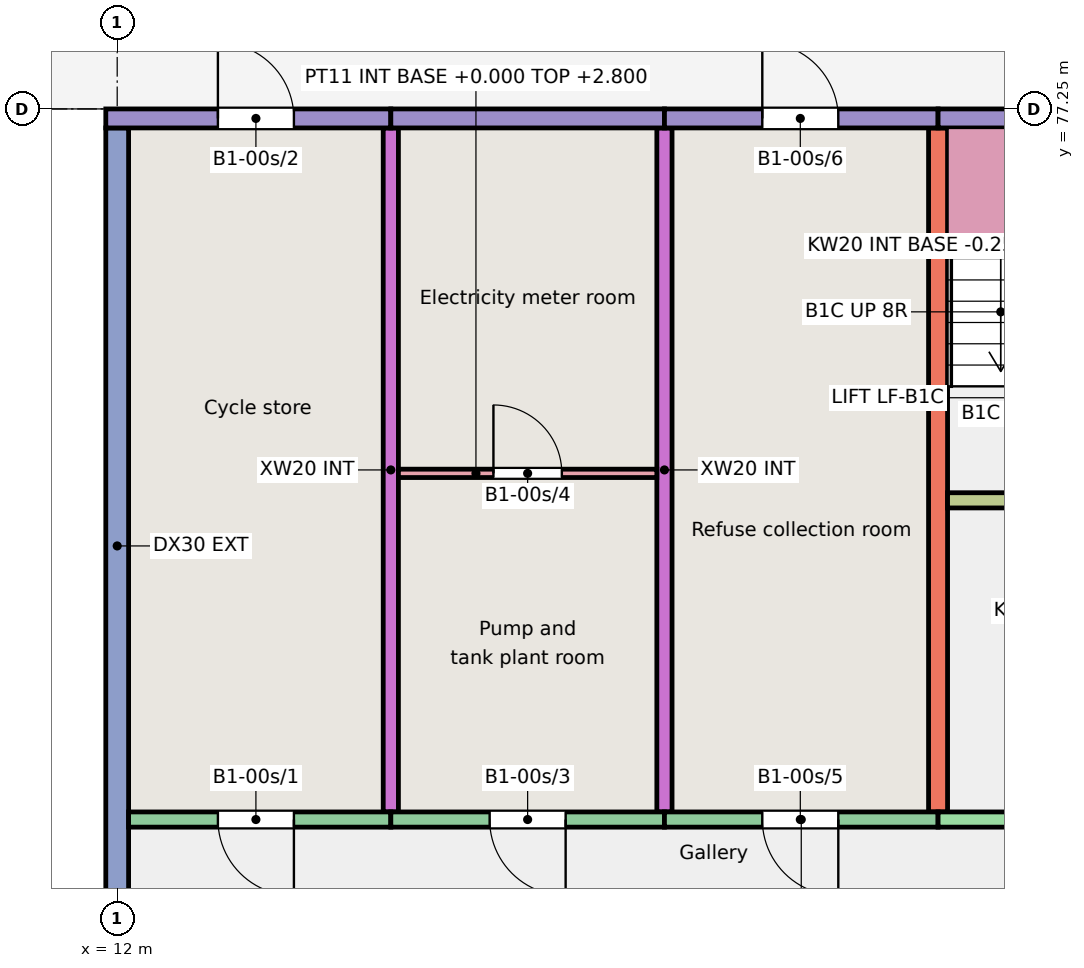
"""IFC4 building model, lengths in metres.
Left out: names, types, materials, properties, quantities, classifications, styles, units other than length and angle.
Written with IfcOpenShell. Run it as: python <this file> out.ifc"""

import sys

from ifc_helpers import new_model, si_unit, direction, frame, frame_2d, origin, place, context, subcontext, project, spatial, rectangle, extrude, element, fill, save


model = new_model("IFC4")
c1 = context("Model", 3, precision=1e-05, world=origin(), true_north=direction((0.0, 1.0)))
c2 = subcontext(c1, "Body", "Model", "MODEL_VIEW")
j1 = project(units=[si_unit("LENGTHUNIT", "METRE"), si_unit("PLANEANGLEUNIT", "RADIAN")], contexts=[c1])
p1 = place(None, origin())
s1 = spatial("IfcSite", under=j1, at=p1, CompositionType="ELEMENT")
p2 = place(p1, origin())
s2 = spatial("IfcBuilding", under=s1, at=p2, CompositionType="ELEMENT")
p3 = place(p2, origin())
s3 = spatial("IfcBuildingStorey", under=s2, at=p3, CompositionType="ELEMENT", Elevation=0.0)
p4 = place(p3, frame((12.0, 66.0, -0.25), z_axis=(0.0, 0.0, 1.0), x_axis=(0.0, 1.0, 0.0)))
e1 = element("IfcWall", 1, at=p4, inside=s3, PredefinedType="SHEAR", context=c2, shape_type="SweptSolid", body=[
    extrude(rectangle(XDim=11.0, YDim=0.3, at=frame_2d((5.5, 0.0))), origin(), (0.0, 0.0, 1.0), 3.25),
])
for number, where, z_axis, x_axis in (
    (2, (15.6, 68.0, -0.25), (0.0, 0.0, 1.0), (0.0, 1.0, 0.0)),
    (3, (19.2, 68.0, -0.25), (0.0, 0.0, 1.0), (0.0, 1.0, 0.0)),
):
    element("IfcWall", number, at=place(p3, frame(where, z_axis=z_axis, x_axis=x_axis)), inside=s3, PredefinedType="SHEAR", context=c2, shape_type="SweptSolid", body=[
        extrude(rectangle(XDim=9.0, YDim=0.2, at=frame_2d((4.5, 0.0))), origin(), (0.0, 0.0, 1.0), 3.25),
    ])
p5 = place(p3, frame((22.8, 68.0, -0.25), z_axis=(0.0, 0.0, 1.0), x_axis=(0.0, 1.0, 0.0)))
e4 = element("IfcWall", 4, at=p5, inside=s3, PredefinedType="SHEAR", context=c2, shape_type="SweptSolid", body=[
    extrude(rectangle(XDim=9.0, YDim=0.25, at=frame_2d((4.5, 0.0))), origin(), (0.0, 0.0, 1.0), 3.25),
])
p6 = place(p3, frame((11.85, 77.125, -0.25), z_axis=(0.0, 0.0, 1.0), x_axis=(1.0, 0.0, 0.0)))
e5 = element("IfcWall", 5, at=p6, inside=s3, PredefinedType="SOLIDWALL", context=c2, shape_type="SweptSolid", body=[
    extrude(rectangle(XDim=3.75, YDim=0.25, at=frame_2d((1.875, 0.0))), origin(), (0.0, 0.0, 1.0), 3.25),
])
p7 = place(p6, frame((1.475, 0.0, 0.25)))
e6 = element("IfcOpeningElement", 6, at=p7, cuts=e5, PredefinedType="OPENING", context=c2, shape_type="SweptSolid", body=[
    extrude(rectangle(XDim=1.0, YDim=2.1, at=frame_2d((0.5, 1.05))), frame((0.0, 0.135, 0.0), z_axis=(0.0, -1.0, 0.0), x_axis=(1.0, 0.0, 0.0)), (0.0, 0.0, 1.0), 0.27),
])
p8 = place(p3, frame((12.15, 67.9, -0.25), z_axis=(0.0, 0.0, 1.0), x_axis=(1.0, 0.0, 0.0)))
e7 = element("IfcWall", 7, at=p8, inside=s3, PredefinedType="SOLIDWALL", context=c2, shape_type="SweptSolid", body=[
    extrude(rectangle(XDim=3.45, YDim=0.2, at=frame_2d((1.725, 0.0))), origin(), (0.0, 0.0, 1.0), 3.25),
])
p9 = place(p8, frame((1.175, 0.0, 0.25)))
e8 = element("IfcOpeningElement", 8, at=p9, cuts=e7, PredefinedType="OPENING", context=c2, shape_type="SweptSolid", body=[
    extrude(rectangle(XDim=1.0, YDim=2.1, at=frame_2d((0.5, 1.05))), frame((0.0, 0.11, 0.0), z_axis=(0.0, -1.0, 0.0), x_axis=(1.0, 0.0, 0.0)), (0.0, 0.0, 1.0), 0.22),
])
p10 = place(p3, frame((15.6, 77.125, -0.25), z_axis=(0.0, 0.0, 1.0), x_axis=(1.0, 0.0, 0.0)))
e9 = element("IfcWall", 9, at=p10, inside=s3, PredefinedType="SOLIDWALL", context=c2, shape_type="SweptSolid", body=[
    extrude(rectangle(XDim=3.6, YDim=0.25, at=frame_2d((1.8, 0.0))), origin(), (0.0, 0.0, 1.0), 3.25),
])
p11 = place(p3, frame((15.6, 67.9, -0.25), z_axis=(0.0, 0.0, 1.0), x_axis=(1.0, 0.0, 0.0)))
e10 = element("IfcWall", 10, at=p11, inside=s3, PredefinedType="SOLIDWALL", context=c2, shape_type="SweptSolid", body=[
    extrude(rectangle(XDim=3.6, YDim=0.2, at=frame_2d((1.8, 0.0))), origin(), (0.0, 0.0, 1.0), 3.25),
])
p12 = place(p11, frame((1.3, 0.0, 0.25)))
e11 = element("IfcOpeningElement", 11, at=p12, cuts=e10, PredefinedType="OPENING", context=c2, shape_type="SweptSolid", body=[
    extrude(rectangle(XDim=1.0, YDim=2.1, at=frame_2d((0.5, 1.05))), frame((0.0, 0.11, 0.0), z_axis=(0.0, -1.0, 0.0), x_axis=(1.0, 0.0, 0.0)), (0.0, 0.0, 1.0), 0.22),
])
p13 = place(p3, frame((19.2, 77.125, -0.25), z_axis=(0.0, 0.0, 1.0), x_axis=(1.0, 0.0, 0.0)))
e12 = element("IfcWall", 12, at=p13, inside=s3, PredefinedType="SOLIDWALL", context=c2, shape_type="SweptSolid", body=[
    extrude(rectangle(XDim=3.6, YDim=0.25, at=frame_2d((1.8, 0.0))), origin(), (0.0, 0.0, 1.0), 3.25),
])
p14 = place(p13, frame((1.288, 0.0, 0.25)))
e13 = element("IfcOpeningElement", 13, at=p14, cuts=e12, PredefinedType="OPENING", context=c2, shape_type="SweptSolid", body=[
    extrude(rectangle(XDim=1.0, YDim=2.1, at=frame_2d((0.5, 1.05))), frame((0.0, 0.135, 0.0), z_axis=(0.0, -1.0, 0.0), x_axis=(1.0, 0.0, 0.0)), (0.0, 0.0, 1.0), 0.27),
])
p15 = place(p3, frame((19.2, 67.9, -0.25), z_axis=(0.0, 0.0, 1.0), x_axis=(1.0, 0.0, 0.0)))
e14 = element("IfcWall", 14, at=p15, inside=s3, PredefinedType="SOLIDWALL", context=c2, shape_type="SweptSolid", body=[
    extrude(rectangle(XDim=3.6, YDim=0.2, at=frame_2d((1.8, 0.0))), origin(), (0.0, 0.0, 1.0), 3.25),
])
p16 = place(p15, frame((1.288, 0.0, 0.25)))
e15 = element("IfcOpeningElement", 15, at=p16, cuts=e14, PredefinedType="OPENING", context=c2, shape_type="SweptSolid", body=[
    extrude(rectangle(XDim=1.0, YDim=2.1, at=frame_2d((0.5, 1.05))), frame((0.0, 0.11, 0.0), z_axis=(0.0, -1.0, 0.0), x_axis=(1.0, 0.0, 0.0)), (0.0, 0.0, 1.0), 0.22),
])
p17 = place(p3, frame((22.8, 77.125, -0.25), z_axis=(0.0, 0.0, 1.0), x_axis=(1.0, 0.0, 0.0)))
e16 = element("IfcWall", 16, at=p17, inside=s3, PredefinedType="SOLIDWALL", context=c2, shape_type="SweptSolid", body=[
    extrude(rectangle(XDim=6.0, YDim=0.25, at=frame_2d((3.0, 0.0))), origin(), (0.0, 0.0, 1.0), 3.25),
])
p18 = place(p17, frame((1.025, 0.0, 0.25)))
e17 = element("IfcOpeningElement", 17, at=p18, cuts=e16, PredefinedType="OPENING", context=c2, shape_type="SweptSolid", body=[
    extrude(rectangle(XDim=1.1, YDim=2.1, at=frame_2d((0.55, 1.05))), frame((0.0, 0.135, 0.0), z_axis=(0.0, -1.0, 0.0), x_axis=(1.0, 0.0, 0.0)), (0.0, 0.0, 1.0), 0.27),
])
p19 = place(p3, frame((22.8, 67.9, -0.25), z_axis=(0.0, 0.0, 1.0), x_axis=(1.0, 0.0, 0.0)))
e18 = element("IfcWall", 18, at=p19, inside=s3, PredefinedType="SHEAR", context=c2, shape_type="SweptSolid", body=[
    extrude(rectangle(XDim=5.85, YDim=0.2, at=frame_2d((2.925, 0.0))), origin(), (0.0, 0.0, 1.0), 3.25),
])
p20 = place(p19, frame((2.438, 0.0, 0.25)))
e19 = element("IfcOpeningElement", 19, at=p20, cuts=e18, PredefinedType="OPENING", context=c2, shape_type="SweptSolid", body=[
    extrude(rectangle(XDim=1.1, YDim=2.1, at=frame_2d((0.55, 1.05))), frame((0.0, 0.11, 0.0), z_axis=(0.0, -1.0, 0.0), x_axis=(1.0, 0.0, 0.0)), (0.0, 0.0, 1.0), 0.22),
])
p21 = place(p3, frame((22.925, 72.1, -0.25), z_axis=(0.0, 0.0, 1.0), x_axis=(1.0, 0.0, 0.0)))
e20 = element("IfcWall", 20, at=p21, inside=s3, PredefinedType="SHEAR", context=c2, shape_type="SweptSolid", body=[
    extrude(rectangle(XDim=5.725, YDim=0.2, at=frame_2d((2.862, 0.0))), origin(), (0.0, 0.0, 1.0), 3.25),
])
p22 = place(p21, frame((0.95, 0.0, 0.25)))
e21 = element("IfcOpeningElement", 21, at=p22, cuts=e20, PredefinedType="OPENING", context=c2, shape_type="SweptSolid", body=[
    extrude(rectangle(XDim=1.0, YDim=2.1, at=frame_2d((0.5, 1.05))), frame((0.0, 0.11, 0.0), z_axis=(0.0, -1.0, 0.0), x_axis=(1.0, 0.0, 0.0)), (0.0, 0.0, 1.0), 0.22),
])
p23 = place(p21, frame((3.863, 0.0, 0.25)))
e22 = element("IfcOpeningElement", 22, at=p23, cuts=e20, PredefinedType="OPENING", context=c2, shape_type="SweptSolid", body=[
    extrude(rectangle(XDim=1.1, YDim=2.1, at=frame_2d((0.55, 1.05))), frame((0.0, 0.11, 0.0), z_axis=(0.0, -1.0, 0.0), x_axis=(1.0, 0.0, 0.0)), (0.0, 0.0, 1.0), 0.22),
])
p24 = place(p3, frame((15.7, 72.455, 0.0), z_axis=(0.0, 0.0, 1.0), x_axis=(1.0, 0.0, 0.0)))
e23 = element("IfcWall", 23, at=p24, inside=s3, PredefinedType="PARTITIONING", context=c2, shape_type="SweptSolid", body=[
    extrude(rectangle(XDim=3.4, YDim=0.11, at=frame_2d((1.7, 0.0))), origin(), (0.0, 0.0, 1.0), 2.8),
])
p25 = place(p24, frame((1.25, 0.0, 0.0)))
e24 = element("IfcOpeningElement", 24, at=p25, cuts=e23, PredefinedType="OPENING", context=c2, shape_type="SweptSolid", body=[
    extrude(rectangle(XDim=0.9, YDim=2.1, at=frame_2d((0.45, 1.05))), frame((0.0, 0.065, 0.0), z_axis=(0.0, -1.0, 0.0), x_axis=(1.0, 0.0, 0.0)), (0.0, 0.0, 1.0), 0.13),
])
p26 = place(p9, origin())
e25 = element("IfcDoor", 25, at=p26, inside=s3, OperationType="SINGLE_SWING_RIGHT", PredefinedType="DOOR", context=c2, shape_type="SweptSolid", body=[
    extrude(rectangle(XDim=1.0, YDim=2.1, at=frame_2d((0.5, 1.05))), frame((0.0, 0.025, 0.0), z_axis=(0.0, -1.0, 0.0), x_axis=(1.0, 0.0, 0.0)), (0.0, 0.0, 1.0), 0.05),
])
fill(e8, e25)
p27 = place(p7, origin())
e26 = element("IfcDoor", 26, at=p27, inside=s3, OperationType="SINGLE_SWING_LEFT", PredefinedType="DOOR", context=c2, shape_type="SweptSolid", body=[
    extrude(rectangle(XDim=1.0, YDim=2.1, at=frame_2d((0.5, 1.05))), frame((0.0, 0.025, 0.0), z_axis=(0.0, -1.0, 0.0), x_axis=(1.0, 0.0, 0.0)), (0.0, 0.0, 1.0), 0.05),
])
fill(e6, e26)
p28 = place(p12, origin())
e27 = element("IfcDoor", 27, at=p28, inside=s3, OperationType="SINGLE_SWING_RIGHT", PredefinedType="DOOR", context=c2, shape_type="SweptSolid", body=[
    extrude(rectangle(XDim=1.0, YDim=2.1, at=frame_2d((0.5, 1.05))), frame((0.0, 0.025, 0.0), z_axis=(0.0, -1.0, 0.0), x_axis=(1.0, 0.0, 0.0)), (0.0, 0.0, 1.0), 0.05),
])
fill(e11, e27)
p29 = place(p25, origin())
e28 = element("IfcDoor", 28, at=p29, inside=s3, OperationType="SINGLE_SWING_LEFT", PredefinedType="DOOR", context=c2, shape_type="SweptSolid", body=[
    extrude(rectangle(XDim=0.9, YDim=2.1, at=frame_2d((0.45, 1.05))), frame((0.0, 0.025, 0.0), z_axis=(0.0, -1.0, 0.0), x_axis=(1.0, 0.0, 0.0)), (0.0, 0.0, 1.0), 0.05),
])
fill(e24, e28)
p30 = place(p16, origin())
e29 = element("IfcDoor", 29, at=p30, inside=s3, OperationType="SINGLE_SWING_RIGHT", PredefinedType="DOOR", context=c2, shape_type="SweptSolid", body=[
    extrude(rectangle(XDim=1.0, YDim=2.1, at=frame_2d((0.5, 1.05))), frame((0.0, 0.025, 0.0), z_axis=(0.0, -1.0, 0.0), x_axis=(1.0, 0.0, 0.0)), (0.0, 0.0, 1.0), 0.05),
])
fill(e15, e29)
p31 = place(p14, origin())
e30 = element("IfcDoor", 30, at=p31, inside=s3, OperationType="SINGLE_SWING_LEFT", PredefinedType="DOOR", context=c2, shape_type="SweptSolid", body=[
    extrude(rectangle(XDim=1.0, YDim=2.1, at=frame_2d((0.5, 1.05))), frame((0.0, 0.025, 0.0), z_axis=(0.0, -1.0, 0.0), x_axis=(1.0, 0.0, 0.0)), (0.0, 0.0, 1.0), 0.05),
])
fill(e13, e30)
save(model, sys.argv[1])
